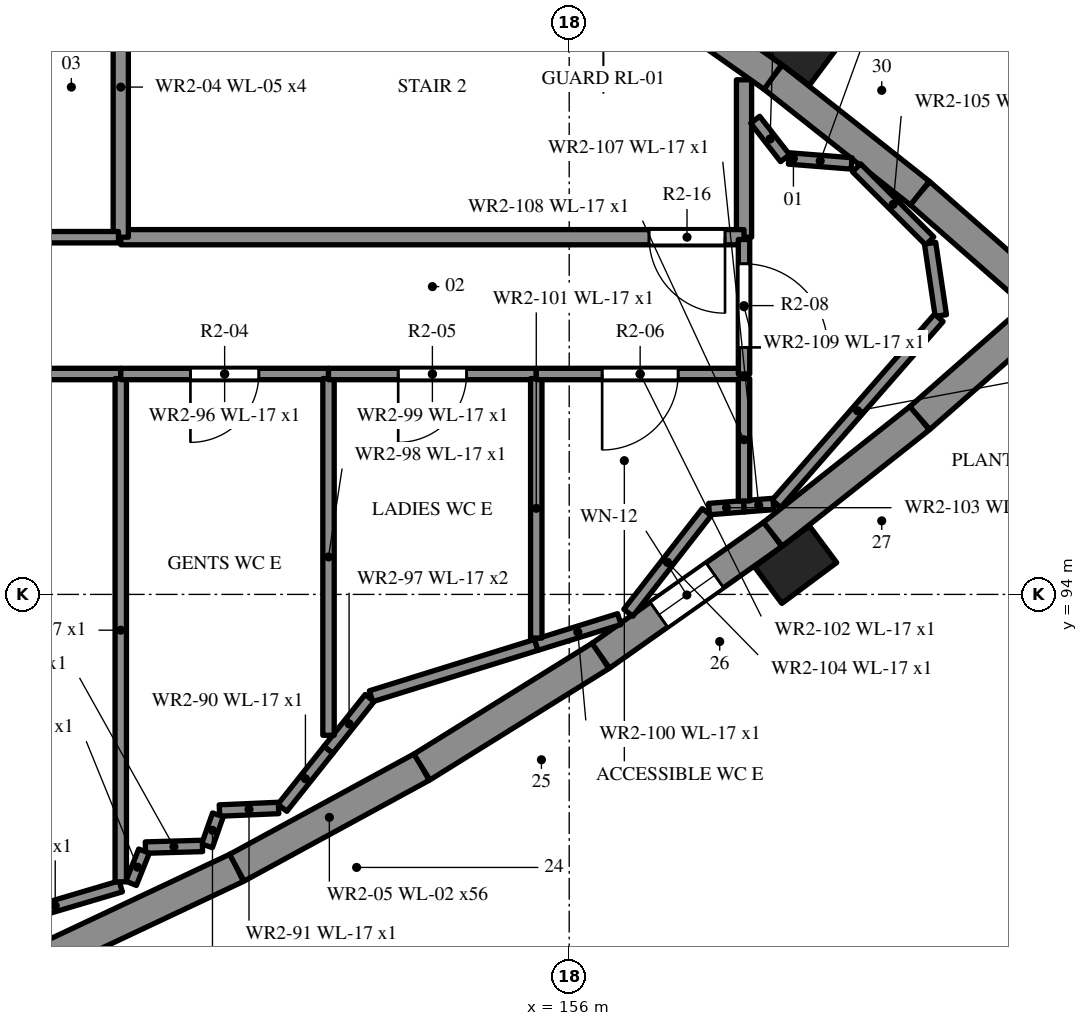
"""IFC4 building model, lengths in metres.
Left out: names, types, materials, properties, quantities, classifications, styles, units other than length and angle.
Written with IfcOpenShell. Run it as: python <this file> out.ifc"""

import sys

from ifc_helpers import new_model, si_unit, direction, frame, frame_2d, origin, origin_2d, place, context, subcontext, project, spatial, polyline, rectangle, outline, extrude, element, fill, save


model = new_model("IFC4")
c1 = context("Model", 3, precision=1e-05, world=origin(), true_north=direction((0.0, 1.0)))
c2 = subcontext(c1, "Body", "Model", "MODEL_VIEW")
j1 = project(units=[si_unit("LENGTHUNIT", "METRE"), si_unit("PLANEANGLEUNIT", "RADIAN")], contexts=[c1])
p1 = place(None, origin())
s1 = spatial("IfcSite", under=j1, at=p1, CompositionType="ELEMENT")
p2 = place(p1, origin())
s2 = spatial("IfcBuilding", under=s1, at=p2, CompositionType="ELEMENT")
p3 = place(p2, frame((0.0, 0.0, 10.2)))
s3 = spatial("IfcBuildingStorey", under=s2, at=p3, CompositionType="ELEMENT", Elevation=10.2)
p4 = place(p3, frame((158.3, 100.771, 0.0), z_axis=(0.0, 0.0, 1.0), x_axis=(0.0, -1.0, 0.0)))
e1 = element("IfcWall", 1, at=p4, inside=s3, PredefinedType="SHEAR", context=c2, shape_type="SweptSolid", body=[
    extrude(outline(polyline([(0.0, 0.0), (2.071, 0.0), (2.071, 5.912), (1.994, 5.842), (0.0, 4.028), (0.0, 0.0)])), frame((0.0, 0.1, 0.0), z_axis=(0.0, -1.0, 0.0), x_axis=(1.0, 0.0, 0.0)), (0.0, 0.0, 1.0), 0.2),
])
p5 = place(p3, frame((158.3, 98.7, 0.0), z_axis=(0.0, 0.0, 1.0), x_axis=(-1.0, 0.0, 0.0)))
e2 = element("IfcWall", 2, at=p5, inside=s3, PredefinedType="SHEAR", context=c2, shape_type="SweptSolid", body=[
    extrude(outline(polyline([(0.0, 0.0), (8.2, 0.0), (8.2, 9.347), (0.381, 5.882), (0.304, 5.911), (0.229, 5.899), (0.062, 5.861), (0.0, 5.845), (0.0, 0.0)])), frame((0.0, 0.1, 0.0), z_axis=(0.0, -1.0, 0.0), x_axis=(1.0, 0.0, 0.0)), (0.0, 0.0, 1.0), 0.2),
])
p6 = place(p5, frame((0.25, 0.0, 0.0)))
e3 = element("IfcOpeningElement", 3, at=p6, cuts=e2, PredefinedType="OPENING", context=c2, shape_type="SweptSolid", body=[
    extrude(rectangle(XDim=1.0, YDim=2.4, at=frame_2d((0.5, 1.2))), frame((0.0, 0.11, 0.0), z_axis=(0.0, -1.0, 0.0), x_axis=(1.0, 0.0, 0.0)), (0.0, 0.0, 1.0), 0.22),
])
p7 = place(p3, frame((150.1, 98.7, 0.0), z_axis=(0.0, 0.0, 1.0), x_axis=(0.0, 1.0, 0.0)))
e4 = element("IfcWall", 4, at=p7, inside=s3, PredefinedType="SHEAR", context=c2, shape_type="SweptSolid", body=[
    extrude(outline(polyline([(0.0, 0.0), (3.95, 0.0), (3.95, 6.132), (2.287, 7.484), (1.991, 7.714), (1.697, 7.948), (0.427, 8.954), (0.304, 9.081), (0.181, 9.214), (0.0, 9.411), (0.0, 0.0)])), frame((0.0, 0.1, 0.0), z_axis=(0.0, -1.0, 0.0), x_axis=(1.0, 0.0, 0.0)), (0.0, 0.0, 1.0), 0.2),
])
p8 = place(p3, frame((149.12, 89.222, 0.0), z_axis=(0.0, 0.0, 1.0), x_axis=(0.904527098751, 0.42641614372, 0.0)))
e5 = element("IfcWall", 5, at=p8, inside=s3, PredefinedType="SOLIDWALL", context=c2, shape_type="SweptSolid", body=[
    extrude(outline(polyline([(0.0, 0.0), (2.772, 0.0), (2.772, 2.787), (2.749, 2.796), (0.21, 3.624), (0.116, 3.655), (0.0, 3.692), (0.0, 0.0)])), frame((0.0, 0.2, 0.0), z_axis=(0.0, -1.0, 0.0), x_axis=(1.0, 0.0, 0.0)), (0.0, 0.0, 1.0), 0.4),
])
p9 = place(p3, frame((151.627, 90.404, 0.0), z_axis=(0.0, 0.0, 1.0), x_axis=(0.878292493566, 0.478123724308, 0.0)))
e6 = element("IfcWall", 6, at=p9, inside=s3, PredefinedType="SOLIDWALL", context=c2, shape_type="SweptSolid", body=[
    extrude(outline(polyline([(0.0, 0.0), (2.772, 0.0), (2.772, 1.966), (2.691, 1.909), (0.0, 2.783), (0.0, 0.0)])), frame((0.0, 0.2, 0.0), z_axis=(0.0, -1.0, 0.0), x_axis=(1.0, 0.0, 0.0)), (0.0, 0.0, 1.0), 0.4),
])
p10 = place(p3, frame((154.062, 91.729, 0.0), z_axis=(0.0, 0.0, 1.0), x_axis=(0.84912946359, 0.528184772653, 0.0)))
e7 = element("IfcWall", 7, at=p10, inside=s3, PredefinedType="SOLIDWALL", context=c2, shape_type="SweptSolid", body=[
    extrude(outline(polyline([(0.0, 0.0), (2.772, 0.0), (2.772, 2.845), (2.451, 2.766), (0.525, 2.14), (0.0, 1.97), (0.0, 0.0)])), frame((0.0, 0.2, 0.0), z_axis=(0.0, -1.0, 0.0), x_axis=(1.0, 0.0, 0.0)), (0.0, 0.0, 1.0), 0.4),
])
p11 = place(p3, frame((156.415, 93.193, 0.0), z_axis=(0.0, 0.0, 1.0), x_axis=(0.817028877428, 0.576596751161, 0.0)))
e8 = element("IfcWall", 8, at=p11, inside=s3, PredefinedType="SOLIDWALL", context=c2, shape_type="SweptSolid", body=[
    extrude(outline(polyline([(0.0, 0.0), (2.772, 0.0), (2.772, 3.555), (2.744, 3.568), (2.603, 3.693), (2.462, 3.647), (0.367, 2.968), (0.0, 2.848), (0.0, 0.0)])), frame((0.0, 0.2, 0.0), z_axis=(0.0, -1.0, 0.0), x_axis=(1.0, 0.0, 0.0)), (0.0, 0.0, 1.0), 0.4),
])
p12 = place(p11, frame((0.936, 0.0, 1.6)))
e9 = element("IfcOpeningElement", 9, at=p12, cuts=e8, PredefinedType="OPENING", context=c2, shape_type="SweptSolid", body=[
    extrude(rectangle(XDim=0.9, YDim=0.6, at=frame_2d((0.45, 0.3))), frame((0.0, 0.21, 0.0), z_axis=(0.0, -1.0, 0.0), x_axis=(1.0, 0.0, 0.0)), (0.0, 0.0, 1.0), 0.42),
])
p13 = place(p3, frame((158.68, 94.792, 0.0), z_axis=(0.0, 0.0, 1.0), x_axis=(0.784278812541, 0.620408530082, 0.0)))
e10 = element("IfcWall", 10, at=p13, inside=s3, PredefinedType="SOLIDWALL", context=c2, shape_type="SweptSolid", body=[
    extrude(outline(polyline([(0.0, 0.0), (2.464, 0.0), (2.464, 2.651), (2.414, 2.669), (0.335, 3.428), (0.177, 3.486), (0.0, 3.551), (0.0, 0.0)])), frame((0.0, 0.2, 0.0), z_axis=(0.0, -1.0, 0.0), x_axis=(1.0, 0.0, 0.0)), (0.0, 0.0, 1.0), 0.4),
])
p14 = place(p3, frame((160.613, 96.32, 0.0), z_axis=(0.0, 0.0, 1.0), x_axis=(0.751212351098, 0.660060605973, 0.0)))
e11 = element("IfcWall", 11, at=p14, inside=s3, PredefinedType="SOLIDWALL", context=c2, shape_type="SweptSolid", body=[
    extrude(outline(polyline([(0.0, 0.0), (2.242, 0.0), (2.242, 1.751), (2.159, 1.784), (2.097, 1.809), (1.869, 1.901), (0.0, 2.647), (0.0, 0.0)])), frame((0.0, 0.2, 0.0), z_axis=(0.0, -1.0, 0.0), x_axis=(1.0, 0.0, 0.0)), (0.0, 0.0, 1.0), 0.4),
])
p15 = place(p3, frame((162.297, 97.8, 0.0), z_axis=(0.0, 0.0, 1.0), x_axis=(-0.751212351098, 0.660060605973, 0.0)))
e12 = element("IfcWall", 12, at=p15, inside=s3, PredefinedType="SOLIDWALL", context=c2, shape_type="SweptSolid", body=[
    extrude(outline(polyline([(0.0, 0.0), (2.242, 0.0), (2.242, 2.647), (2.202, 2.635), (0.372, 1.901), (0.145, 1.809), (0.083, 1.784), (0.0, 1.751), (0.0, 0.0)])), frame((0.0, 0.2, 0.0), z_axis=(0.0, -1.0, 0.0), x_axis=(1.0, 0.0, 0.0)), (0.0, 0.0, 1.0), 0.4),
])
p16 = place(p3, frame((160.613, 99.28, 0.0), z_axis=(0.0, 0.0, 1.0), x_axis=(-0.784278812541, 0.620408530082, 0.0)))
e13 = element("IfcWall", 13, at=p16, inside=s3, PredefinedType="SOLIDWALL", context=c2, shape_type="SweptSolid", body=[
    extrude(outline(polyline([(0.0, 0.0), (2.464, 0.0), (2.464, 3.551), (2.446, 3.544), (2.288, 3.486), (2.129, 3.428), (0.051, 2.669), (0.0, 2.651), (0.0, 0.0)])), frame((0.0, 0.2, 0.0), z_axis=(0.0, -1.0, 0.0), x_axis=(1.0, 0.0, 0.0)), (0.0, 0.0, 1.0), 0.4),
])
p17 = place(p3, frame((158.68, 100.809, 0.0), z_axis=(0.0, 0.0, 1.0), x_axis=(-0.817070367038, 0.57653795652, 0.0)))
e14 = element("IfcWall", 14, at=p17, inside=s3, PredefinedType="SOLIDWALL", context=c2, shape_type="SweptSolid", body=[
    extrude(outline(polyline([(0.0, 0.0), (2.772, 0.0), (2.772, 2.848), (2.406, 2.968), (0.311, 3.647), (0.169, 3.693), (0.0, 3.555), (0.0, 0.0)])), frame((0.0, 0.2, 0.0), z_axis=(0.0, -1.0, 0.0), x_axis=(1.0, 0.0, 0.0)), (0.0, 0.0, 1.0), 0.4),
])
for number, where, z_axis, x_axis in (
    (15, (158.979, 94.391, 0.0), (0.0, 0.0, 1.0), (0.802, 0.597, 0.0)),
    (16, (158.979, 101.209, 0.0), (0.0, 0.0, 1.0), (-0.802, 0.597, 0.0)),
):
    element("IfcColumn", number, at=place(p3, frame(where, z_axis=z_axis, x_axis=x_axis)), inside=s3, PredefinedType="PILASTER", context=c2, shape_type="SweptSolid", body=[
        extrude(rectangle(XDim=0.9, YDim=0.6, at=origin_2d()), origin(), (0.0, 0.0, 1.0), 2.507),
    ])
p18 = place(p3, frame((150.1, 96.9, 0.0), z_axis=(0.0, 0.0, 1.0), x_axis=(-1.0, 0.0, 0.0)))
e17 = element("IfcWall", 17, at=p18, inside=s3, PredefinedType="PARTITIONING", context=c2, shape_type="SweptSolid", body=[
    extrude(rectangle(XDim=18.6, YDim=0.15, at=frame_2d((9.3, 0.0))), origin(), (0.0, 0.0, 1.0), 2.5),
])
p19 = place(p18, frame((13.05, 0.0, 0.0)))
e18 = element("IfcOpeningElement", 18, at=p19, cuts=e17, PredefinedType="OPENING", context=c2, shape_type="SweptSolid", body=[
    extrude(rectangle(XDim=1.8, YDim=2.1, at=frame_2d((0.9, 1.05))), frame((0.0, 0.085, 0.0), z_axis=(0.0, -1.0, 0.0), x_axis=(1.0, 0.0, 0.0)), (0.0, 0.0, 1.0), 0.17),
])
p20 = place(p18, frame((3.75, 0.0, 0.0)))
e19 = element("IfcOpeningElement", 19, at=p20, cuts=e17, PredefinedType="OPENING", context=c2, shape_type="SweptSolid", body=[
    extrude(rectangle(XDim=1.8, YDim=2.1, at=frame_2d((0.9, 1.05))), frame((0.0, 0.085, 0.0), z_axis=(0.0, -1.0, 0.0), x_axis=(1.0, 0.0, 0.0)), (0.0, 0.0, 1.0), 0.17),
])
p21 = place(p3, frame((140.5, 98.7, 0.0), z_axis=(0.0, 0.0, 1.0), x_axis=(1.0, 0.0, 0.0)))
e20 = element("IfcWall", 20, at=p21, inside=s3, PredefinedType="PARTITIONING", context=c2, shape_type="SweptSolid", body=[
    extrude(rectangle(XDim=9.57, YDim=0.15, at=frame_2d((4.785, 0.0))), origin(), (0.0, 0.0, 1.0), 2.5),
])
p22 = place(p21, frame((4.3, 0.0, 0.0)))
e21 = element("IfcOpeningElement", 21, at=p22, cuts=e20, PredefinedType="OPENING", context=c2, shape_type="SweptSolid", body=[
    extrude(rectangle(XDim=1.0, YDim=2.1, at=frame_2d((0.5, 1.05))), frame((0.0, 0.085, 0.0), z_axis=(0.0, -1.0, 0.0), x_axis=(1.0, 0.0, 0.0)), (0.0, 0.0, 1.0), 0.17),
])
p23 = place(p3, frame((150.1, 90.158, 0.0), z_axis=(0.0, 0.0, 1.0), x_axis=(-0.958762505139, -0.284208477599, 0.0)))
e22 = element("IfcWall", 22, at=p23, inside=s3, PredefinedType="PARTITIONING", context=c2, shape_type="SweptSolid", body=[
    extrude(rectangle(XDim=1.799, YDim=0.15, at=frame_2d((0.899, 0.0))), origin(), (0.0, 0.0, 1.0), 2.5),
])
p24 = place(p3, frame((152.833, 91.956, 0.0), z_axis=(0.0, 0.0, 1.0), x_axis=(-0.622220537754, -0.78284200347, 0.0)))
e23 = element("IfcWall", 23, at=p24, inside=s3, PredefinedType="PARTITIONING", context=c2, shape_type="SweptSolid", body=[
    extrude(rectangle(XDim=0.976, YDim=0.15, at=frame_2d((0.488, 0.0))), origin(), (0.0, 0.0, 1.0), 2.5),
])
p25 = place(p3, frame((152.176, 91.19, 0.0), z_axis=(0.0, 0.0, 1.0), x_axis=(-0.999049042967, -0.043600570478, 0.0)))
e24 = element("IfcWall", 24, at=p25, inside=s3, PredefinedType="PARTITIONING", context=c2, shape_type="SweptSolid", body=[
    extrude(rectangle(XDim=0.778, YDim=0.15, at=frame_2d((0.389, 0.0))), origin(), (0.0, 0.0, 1.0), 2.5),
])
p26 = place(p3, frame((151.378, 91.1, 0.0), z_axis=(0.0, 0.0, 1.0), x_axis=(-0.332967964118, -0.942938139472, 0.0)))
e25 = element("IfcWall", 25, at=p26, inside=s3, PredefinedType="PARTITIONING", context=c2, shape_type="SweptSolid", body=[
    extrude(rectangle(XDim=0.432, YDim=0.15, at=frame_2d((0.216, 0.0))), origin(), (0.0, 0.0, 1.0), 2.5),
])
p27 = place(p3, frame((151.175, 90.691, 0.0), z_axis=(0.0, 0.0, 1.0), x_axis=(-0.999580594318, -0.028959203416, 0.0)))
e26 = element("IfcWall", 26, at=p27, inside=s3, PredefinedType="PARTITIONING", context=c2, shape_type="SweptSolid", body=[
    extrude(rectangle(XDim=0.75, YDim=0.15, at=frame_2d((0.375, 0.0))), origin(), (0.0, 0.0, 1.0), 2.5),
])
p28 = place(p3, frame((150.406, 90.623, 0.0), z_axis=(0.0, 0.0, 1.0), x_axis=(-0.372588519489, -0.927996656861, 0.0)))
e27 = element("IfcWall", 27, at=p28, inside=s3, PredefinedType="PARTITIONING", context=c2, shape_type="SweptSolid", body=[
    extrude(rectangle(XDim=0.457, YDim=0.15, at=frame_2d((0.229, 0.0))), origin(), (0.0, 0.0, 1.0), 2.5),
])
p29 = place(p3, frame((150.1, 90.219, 0.0), z_axis=(0.0, 0.0, 1.0), x_axis=(0.0, 1.0, 0.0)))
e28 = element("IfcWall", 28, at=p29, inside=s3, PredefinedType="PARTITIONING", context=c2, shape_type="SweptSolid", body=[
    extrude(rectangle(XDim=6.622, YDim=0.15, at=frame_2d((3.311, 0.0))), origin(), (0.0, 0.0, 1.0), 2.5),
])
p30 = place(p3, frame((152.833, 96.9, 0.0), z_axis=(0.0, 0.0, 1.0), x_axis=(-1.0, 0.0, 0.0)))
e29 = element("IfcWall", 29, at=p30, inside=s3, PredefinedType="PARTITIONING", context=c2, shape_type="SweptSolid", body=[
    extrude(rectangle(XDim=2.733, YDim=0.15, at=frame_2d((1.367, 0.0))), origin(), (0.0, 0.0, 1.0), 2.5),
])
p31 = place(p30, frame((0.917, 0.0, 0.0)))
e30 = element("IfcOpeningElement", 30, at=p31, cuts=e29, PredefinedType="OPENING", context=c2, shape_type="SweptSolid", body=[
    extrude(rectangle(XDim=0.9, YDim=2.1, at=frame_2d((0.45, 1.05))), frame((0.0, 0.085, 0.0), z_axis=(0.0, -1.0, 0.0), x_axis=(1.0, 0.0, 0.0)), (0.0, 0.0, 1.0), 0.17),
])
p32 = place(p3, frame((155.567, 93.336, 0.0), z_axis=(0.0, 0.0, 1.0), x_axis=(-0.954993948464, -0.296625282802, 0.0)))
e31 = element("IfcWall", 31, at=p32, inside=s3, PredefinedType="PARTITIONING", context=c2, shape_type="SweptSolid", body=[
    extrude(rectangle(XDim=2.276, YDim=0.15, at=frame_2d((1.138, 0.0))), origin(), (0.0, 0.0, 1.0), 2.5),
])
p33 = place(p3, frame((153.375, 92.637, 0.0), z_axis=(0.0, 0.0, 1.0), x_axis=(-0.622433718028, -0.782672515591, 0.0)))
e32 = element("IfcWall", 32, at=p33, inside=s3, PredefinedType="PARTITIONING", context=c2, shape_type="SweptSolid", body=[
    extrude(rectangle(XDim=0.87, YDim=0.15, at=frame_2d((0.435, 0.0))), origin(), (0.0, 0.0, 1.0), 2.5),
])
p34 = place(p3, frame((152.833, 96.84, 0.0), z_axis=(0.0, 0.0, 1.0), x_axis=(0.0, -1.0, 0.0)))
e33 = element("IfcWall", 33, at=p34, inside=s3, PredefinedType="PARTITIONING", context=c2, shape_type="SweptSolid", body=[
    extrude(rectangle(XDim=4.694, YDim=0.15, at=frame_2d((2.347, 0.0))), origin(), (0.0, 0.0, 1.0), 2.5),
])
p35 = place(p3, frame((155.567, 96.9, 0.0), z_axis=(0.0, 0.0, 1.0), x_axis=(-1.0, 0.0, 0.0)))
e34 = element("IfcWall", 34, at=p35, inside=s3, PredefinedType="PARTITIONING", context=c2, shape_type="SweptSolid", body=[
    extrude(rectangle(XDim=2.733, YDim=0.15, at=frame_2d((1.367, 0.0))), origin(), (0.0, 0.0, 1.0), 2.5),
])
p36 = place(p35, frame((0.917, 0.0, 0.0)))
e35 = element("IfcOpeningElement", 35, at=p36, cuts=e34, PredefinedType="OPENING", context=c2, shape_type="SweptSolid", body=[
    extrude(rectangle(XDim=0.9, YDim=2.1, at=frame_2d((0.45, 1.05))), frame((0.0, 0.085, 0.0), z_axis=(0.0, -1.0, 0.0), x_axis=(1.0, 0.0, 0.0)), (0.0, 0.0, 1.0), 0.17),
])
p37 = place(p3, frame((156.659, 93.675, 0.0), z_axis=(0.0, 0.0, 1.0), x_axis=(-0.954991198107, -0.296634137513, 0.0)))
e36 = element("IfcWall", 36, at=p37, inside=s3, PredefinedType="PARTITIONING", context=c2, shape_type="SweptSolid", body=[
    extrude(rectangle(XDim=1.144, YDim=0.15, at=frame_2d((0.572, 0.0))), origin(), (0.0, 0.0, 1.0), 2.5),
])
p38 = place(p3, frame((155.567, 96.84, 0.0), z_axis=(0.0, 0.0, 1.0), x_axis=(0.0, -1.0, 0.0)))
e37 = element("IfcWall", 37, at=p38, inside=s3, PredefinedType="PARTITIONING", context=c2, shape_type="SweptSolid", body=[
    extrude(rectangle(XDim=3.414, YDim=0.15, at=frame_2d((1.707, 0.0))), origin(), (0.0, 0.0, 1.0), 2.5),
])
p39 = place(p3, frame((158.3, 96.9, 0.0), z_axis=(0.0, 0.0, 1.0), x_axis=(-1.0, 0.0, 0.0)))
e38 = element("IfcWall", 38, at=p39, inside=s3, PredefinedType="PARTITIONING", context=c2, shape_type="SweptSolid", body=[
    extrude(rectangle(XDim=2.733, YDim=0.15, at=frame_2d((1.367, 0.0))), origin(), (0.0, 0.0, 1.0), 2.5),
])
p40 = place(p39, frame((0.867, 0.0, 0.0)))
e39 = element("IfcOpeningElement", 39, at=p40, cuts=e38, PredefinedType="OPENING", context=c2, shape_type="SweptSolid", body=[
    extrude(rectangle(XDim=1.0, YDim=2.1, at=frame_2d((0.5, 1.05))), frame((0.0, 0.085, 0.0), z_axis=(0.0, -1.0, 0.0), x_axis=(1.0, 0.0, 0.0)), (0.0, 0.0, 1.0), 0.17),
])
p41 = place(p3, frame((158.3, 95.159, 0.0), z_axis=(0.0, 0.0, 1.0), x_axis=(-0.996890500496, -0.078799302161, 0.0)))
e40 = element("IfcWall", 40, at=p41, inside=s3, PredefinedType="PARTITIONING", context=c2, shape_type="SweptSolid", body=[
    extrude(rectangle(XDim=0.462, YDim=0.15, at=frame_2d((0.231, 0.0))), origin(), (0.0, 0.0, 1.0), 2.5),
])
p42 = place(p3, frame((157.809, 95.083, 0.0), z_axis=(0.0, 0.0, 1.0), x_axis=(-0.614282868135, -0.789085900213, 0.0)))
e41 = element("IfcWall", 41, at=p42, inside=s3, PredefinedType="PARTITIONING", context=c2, shape_type="SweptSolid", body=[
    extrude(rectangle(XDim=1.679, YDim=0.15, at=frame_2d((0.839, 0.0))), origin(), (0.0, 0.0, 1.0), 2.5),
])
p43 = place(p3, frame((159.78, 99.614, 0.0), z_axis=(0.0, 0.0, 1.0), x_axis=(0.707106781187, -0.707106781187, 0.0)))
e42 = element("IfcWall", 42, at=p43, inside=s3, PredefinedType="PARTITIONING", context=c2, shape_type="SweptSolid", body=[
    extrude(rectangle(XDim=1.362, YDim=0.15, at=frame_2d((0.681, 0.0))), origin(), (0.0, 0.0, 1.0), 2.5),
])
p44 = place(p3, frame((160.748, 98.621, 0.0), z_axis=(0.0, 0.0, 1.0), x_axis=(0.146925710548, -0.989147529735, 0.0)))
e43 = element("IfcWall", 43, at=p44, inside=s3, PredefinedType="PARTITIONING", context=c2, shape_type="SweptSolid", body=[
    extrude(rectangle(XDim=0.962, YDim=0.15, at=frame_2d((0.481, 0.0))), origin(), (0.0, 0.0, 1.0), 2.5),
])
p45 = place(p3, frame((160.863, 97.639, 0.0), z_axis=(0.0, 0.0, 1.0), x_axis=(-0.658009618923, -0.753009522785, 0.0)))
e44 = element("IfcWall", 44, at=p45, inside=s3, PredefinedType="PARTITIONING", context=c2, shape_type="SweptSolid", body=[
    extrude(rectangle(XDim=3.248, YDim=0.15, at=frame_2d((1.624, 0.0))), origin(), (0.0, 0.0, 1.0), 2.5),
])
p46 = place(p3, frame((158.686, 95.19, 0.0), z_axis=(0.0, 0.0, 1.0), x_axis=(-0.996881179816, -0.078917129498, 0.0)))
e45 = element("IfcWall", 45, at=p46, inside=s3, PredefinedType="PARTITIONING", context=c2, shape_type="SweptSolid", body=[
    extrude(rectangle(XDim=0.387, YDim=0.15, at=frame_2d((0.193, 0.0))), origin(), (0.0, 0.0, 1.0), 2.5),
])
p47 = place(p3, frame((158.3, 96.84, 0.0), z_axis=(0.0, 0.0, 1.0), x_axis=(0.0, -1.0, 0.0)))
e46 = element("IfcWall", 46, at=p47, inside=s3, PredefinedType="PARTITIONING", context=c2, shape_type="SweptSolid", body=[
    extrude(rectangle(XDim=1.611, YDim=0.15, at=frame_2d((0.805, 0.0))), origin(), (0.0, 0.0, 1.0), 2.5),
])
p48 = place(p3, frame((158.3, 98.67, 0.0), z_axis=(0.0, 0.0, 1.0), x_axis=(0.0, -1.0, 0.0)))
e47 = element("IfcWall", 47, at=p48, inside=s3, PredefinedType="PARTITIONING", context=c2, shape_type="SweptSolid", body=[
    extrude(rectangle(XDim=1.77, YDim=0.15, at=frame_2d((0.885, 0.0))), origin(), (0.0, 0.0, 1.0), 2.5),
])
p49 = place(p48, frame((0.32, 0.0, 0.0)))
e48 = element("IfcOpeningElement", 48, at=p49, cuts=e47, PredefinedType="OPENING", context=c2, shape_type="SweptSolid", body=[
    extrude(rectangle(XDim=1.1, YDim=2.1, at=frame_2d((0.55, 1.05))), frame((0.0, 0.085, 0.0), z_axis=(0.0, -1.0, 0.0), x_axis=(1.0, 0.0, 0.0)), (0.0, 0.0, 1.0), 0.17),
])
p50 = place(p3, frame((158.447, 100.245, 0.0), z_axis=(0.0, 0.0, 1.0), x_axis=(0.614125450495, -0.789208420542, 0.0)))
e49 = element("IfcWall", 49, at=p50, inside=s3, PredefinedType="PARTITIONING", context=c2, shape_type="SweptSolid", body=[
    extrude(rectangle(XDim=0.64, YDim=0.15, at=frame_2d((0.32, 0.0))), origin(), (0.0, 0.0, 1.0), 2.5),
])
p51 = place(p3, frame((158.89, 99.736, 0.0), z_axis=(0.0, 0.0, 1.0), x_axis=(0.996876817873, -0.078972210225, 0.0)))
e50 = element("IfcWall", 50, at=p51, inside=s3, PredefinedType="PARTITIONING", context=c2, shape_type="SweptSolid", body=[
    extrude(rectangle(XDim=0.829, YDim=0.15, at=frame_2d((0.414, 0.0))), origin(), (0.0, 0.0, 1.0), 2.5),
])
p52 = place(p12, origin())
e51 = element("IfcWindow", 51, at=p52, inside=s3, PartitioningType="SINGLE_PANEL", PredefinedType="WINDOW", context=c2, shape_type="SweptSolid", body=[
    extrude(rectangle(XDim=0.9, YDim=0.6, at=frame_2d((0.45, 0.3))), frame((0.0, 0.03, 0.0), z_axis=(0.0, -1.0, 0.0), x_axis=(1.0, 0.0, 0.0)), (0.0, 0.0, 1.0), 0.06),
])
fill(e9, e51)
p53 = place(p31, origin())
e52 = element("IfcDoor", 52, at=p53, inside=s3, OperationType="SINGLE_SWING_RIGHT", PredefinedType="DOOR", context=c2, shape_type="SweptSolid", body=[
    extrude(rectangle(XDim=0.9, YDim=2.1, at=frame_2d((0.45, 1.05))), frame((0.0, 0.025, 0.0), z_axis=(0.0, -1.0, 0.0), x_axis=(1.0, 0.0, 0.0)), (0.0, 0.0, 1.0), 0.05),
])
fill(e30, e52)
p54 = place(p36, origin())
e53 = element("IfcDoor", 53, at=p54, inside=s3, OperationType="SINGLE_SWING_RIGHT", PredefinedType="DOOR", context=c2, shape_type="SweptSolid", body=[
    extrude(rectangle(XDim=0.9, YDim=2.1, at=frame_2d((0.45, 1.05))), frame((0.0, 0.025, 0.0), z_axis=(0.0, -1.0, 0.0), x_axis=(1.0, 0.0, 0.0)), (0.0, 0.0, 1.0), 0.05),
])
fill(e35, e53)
p55 = place(p40, origin())
e54 = element("IfcDoor", 54, at=p55, inside=s3, OperationType="SINGLE_SWING_RIGHT", PredefinedType="DOOR", context=c2, shape_type="SweptSolid", body=[
    extrude(rectangle(XDim=1.0, YDim=2.1, at=frame_2d((0.5, 1.05))), frame((0.0, 0.025, 0.0), z_axis=(0.0, -1.0, 0.0), x_axis=(1.0, 0.0, 0.0)), (0.0, 0.0, 1.0), 0.05),
])
fill(e39, e54)
p56 = place(p49, origin())
e55 = element("IfcDoor", 55, at=p56, inside=s3, OperationType="SINGLE_SWING_RIGHT", PredefinedType="DOOR", context=c2, shape_type="SweptSolid", body=[
    extrude(rectangle(XDim=1.1, YDim=2.1, at=frame_2d((0.55, 1.05))), frame((0.0, 0.025, 0.0), z_axis=(0.0, -1.0, 0.0), x_axis=(1.0, 0.0, 0.0)), (0.0, 0.0, 1.0), 0.05),
])
fill(e48, e55)
p57 = place(p6, origin())
e56 = element("IfcDoor", 56, at=p57, inside=s3, OperationType="SINGLE_SWING_LEFT", PredefinedType="DOOR", context=c2, shape_type="SweptSolid", body=[
    extrude(rectangle(XDim=1.0, YDim=2.4, at=frame_2d((0.5, 1.2))), frame((0.0, 0.025, 0.0), z_axis=(0.0, -1.0, 0.0), x_axis=(1.0, 0.0, 0.0)), (0.0, 0.0, 1.0), 0.05),
])
fill(e3, e56)
save(model, sys.argv[1])
